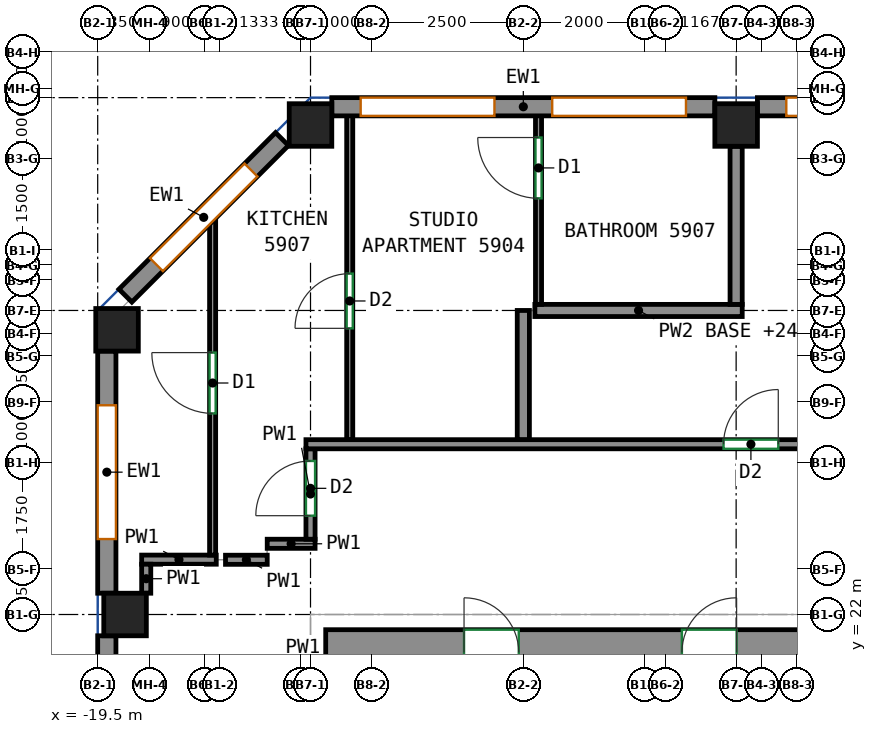
"""IFC4 building model, lengths in metres.
Left out: names, types, materials, properties, quantities, classifications, styles, units other than length and angle.
Written with IfcOpenShell. Run it as: python <this file> out.ifc"""

import sys

from ifc_helpers import new_model, si_unit, direction, frame, frame_2d, origin, origin_2d, place, context, subcontext, project, spatial, rectangle, extrude, source, transform, mapped, element, fill, save


model = new_model("IFC4")
c1 = context("Model", 3, precision=1e-05, world=origin(), true_north=direction((0.0, 1.0)))
c2 = subcontext(c1, "Body", "Model", "MODEL_VIEW")
j1 = project(units=[si_unit("LENGTHUNIT", "METRE"), si_unit("PLANEANGLEUNIT", "RADIAN")], contexts=[c1])
p1 = place(None, origin())
s1 = spatial("IfcSite", under=j1, at=p1, CompositionType="ELEMENT")
p2 = place(p1, origin())
s2 = spatial("IfcBuilding", under=s1, at=p2, CompositionType="ELEMENT")
p3 = place(p2, frame((0.0, 0.0, 245.8)))
s3 = spatial("IfcBuildingStorey", under=s2, at=p3, CompositionType="ELEMENT", Elevation=245.8)
m1 = source(origin(), c2, "Body", "SweptSolid", [
    extrude(rectangle(XDim=0.7, YDim=0.7, at=origin_2d()), origin(), (0.0, 0.0, 1.0), 3.12),
])
for number, where, z_axis, x_axis in (
    (1, (-19.182, 26.682, 0.0), (0.0, 0.0, 1.0), (1.0, 0.0, 0.0)),
    (2, (-19.05, 22.0, 0.0), (0.0, 0.0, 1.0), (1.0, 0.0, 0.0)),
    (3, (-16.0, 30.05, 0.0), (0.0, 0.0, 1.0), (1.0, 0.0, 0.0)),
    (4, (-9.0, 30.05, 0.0), (0.0, 0.0, 1.0), (1.0, 0.0, 0.0)),
):
    element("IfcColumn", number, at=place(p3, frame(where, z_axis=z_axis, x_axis=x_axis)), inside=s3, PredefinedType="COLUMN", context=c2, shape_type="MappedRepresentation", body=[
        mapped(m1, transform((0.0, 0.0, 0.0))),
    ])
m2 = source(origin(), c2, "Body", "SweptSolid", [
    extrude(rectangle(XDim=33.6, YDim=0.75, at=frame_2d((16.8, 0.0))), origin(), (0.0, 0.0, 1.0), 3.12),
])
p4 = place(p3, frame((-15.75, 21.375, 0.0), z_axis=(0.0, 0.0, 1.0), x_axis=(1.0, 0.0, 0.0)))
e5 = element("IfcWall", 5, at=p4, inside=s3, PredefinedType="SHEAR", context=c2, shape_type="MappedRepresentation", body=[
    mapped(m2, transform((0.0, 0.0, 0.0))),
])
p5 = place(p4, frame((5.858, 0.0, 0.0)))
e6 = element("IfcOpeningElement", 6, at=p5, cuts=e5, PredefinedType="OPENING", context=c2, shape_type="SweptSolid", body=[
    extrude(rectangle(XDim=0.9, YDim=2.1, at=frame_2d((0.45, 1.05))), frame((0.0, 0.385, 0.0), z_axis=(0.0, -1.0, 0.0), x_axis=(1.0, 0.0, 0.0)), (0.0, 0.0, 1.0), 0.77),
])
p6 = place(p4, frame((10.923, 0.0, 0.0)))
e7 = element("IfcOpeningElement", 7, at=p6, cuts=e5, PredefinedType="OPENING", context=c2, shape_type="SweptSolid", body=[
    extrude(rectangle(XDim=0.9, YDim=2.1, at=frame_2d((0.45, 1.05))), frame((0.0, 0.385, 0.0), z_axis=(0.0, -1.0, 0.0), x_axis=(1.0, 0.0, 0.0)), (0.0, 0.0, 1.0), 0.77),
])
p7 = place(p4, frame((15.988, 0.0, 0.0)))
e8 = element("IfcOpeningElement", 8, at=p7, cuts=e5, PredefinedType="OPENING", context=c2, shape_type="SweptSolid", body=[
    extrude(rectangle(XDim=0.9, YDim=2.1, at=frame_2d((0.45, 1.05))), frame((0.0, 0.385, 0.0), z_axis=(0.0, -1.0, 0.0), x_axis=(1.0, 0.0, 0.0)), (0.0, 0.0, 1.0), 0.77),
])
p8 = place(p4, frame((21.643, 0.0, 0.0)))
e9 = element("IfcOpeningElement", 9, at=p8, cuts=e5, PredefinedType="OPENING", context=c2, shape_type="SweptSolid", body=[
    extrude(rectangle(XDim=0.9, YDim=2.1, at=frame_2d((0.45, 1.05))), frame((0.0, 0.385, 0.0), z_axis=(0.0, -1.0, 0.0), x_axis=(1.0, 0.0, 0.0)), (0.0, 0.0, 1.0), 0.77),
])
p9 = place(p4, frame((27.07, 0.0, 0.0)))
e10 = element("IfcOpeningElement", 10, at=p9, cuts=e5, PredefinedType="OPENING", context=c2, shape_type="SweptSolid", body=[
    extrude(rectangle(XDim=0.9, YDim=2.1, at=frame_2d((0.45, 1.05))), frame((0.0, 0.385, 0.0), z_axis=(0.0, -1.0, 0.0), x_axis=(1.0, 0.0, 0.0)), (0.0, 0.0, 1.0), 0.77),
])
p10 = place(p4, frame((2.275, 0.0, 0.0)))
e11 = element("IfcOpeningElement", 11, at=p10, cuts=e5, PredefinedType="OPENING", context=c2, shape_type="SweptSolid", body=[
    extrude(rectangle(XDim=0.9, YDim=2.1, at=frame_2d((0.45, 1.05))), frame((0.0, 0.385, 0.0), z_axis=(0.0, -1.0, 0.0), x_axis=(1.0, 0.0, 0.0)), (0.0, 0.0, 1.0), 0.77),
])
p11 = place(p4, frame((30.425, 0.0, 0.0)))
e12 = element("IfcOpeningElement", 12, at=p11, cuts=e5, PredefinedType="OPENING", context=c2, shape_type="SweptSolid", body=[
    extrude(rectangle(XDim=0.9, YDim=2.1, at=frame_2d((0.45, 1.05))), frame((0.0, 0.385, 0.0), z_axis=(0.0, -1.0, 0.0), x_axis=(1.0, 0.0, 0.0)), (0.0, 0.0, 1.0), 0.77),
])
m3 = source(origin(), c2, "Body", "SweptSolid", [
    extrude(rectangle(XDim=6.3, YDim=0.3, at=frame_2d((3.15, 0.0))), origin(), (0.0, 0.0, 1.0), 3.12),
])
p12 = place(p3, frame((-2.35, 30.35, 0.0), z_axis=(0.0, 0.0, 1.0), x_axis=(-1.0, 0.0, 0.0)))
e13 = element("IfcWall", 13, at=p12, inside=s3, PredefinedType="SOLIDWALL", context=c2, shape_type="MappedRepresentation", body=[
    mapped(m3, transform((0.0, 0.0, 0.0))),
])
p13 = place(p12, frame((0.475, 0.0, 0.8)))
e14 = element("IfcOpeningElement", 14, at=p13, cuts=e13, PredefinedType="OPENING", context=c2, shape_type="SweptSolid", body=[
    extrude(rectangle(XDim=2.2, YDim=2.05, at=frame_2d((1.1, 1.025))), frame((0.0, 0.16, 0.0), z_axis=(0.0, -1.0, 0.0), x_axis=(1.0, 0.0, 0.0)), (0.0, 0.0, 1.0), 0.32),
])
p14 = place(p12, frame((3.625, 0.0, 0.8)))
e15 = element("IfcOpeningElement", 15, at=p14, cuts=e13, PredefinedType="OPENING", context=c2, shape_type="SweptSolid", body=[
    extrude(rectangle(XDim=2.2, YDim=2.05, at=frame_2d((1.1, 1.025))), frame((0.0, 0.16, 0.0), z_axis=(0.0, -1.0, 0.0), x_axis=(1.0, 0.0, 0.0)), (0.0, 0.0, 1.0), 0.32),
])
p15 = place(p3, frame((-9.35, 30.35, 0.0), z_axis=(0.0, 0.0, 1.0), x_axis=(-1.0, 0.0, 0.0)))
e16 = element("IfcWall", 16, at=p15, inside=s3, PredefinedType="SOLIDWALL", context=c2, shape_type="MappedRepresentation", body=[
    mapped(m3, transform((0.0, 0.0, 0.0))),
])
p16 = place(p15, frame((0.475, 0.0, 0.8)))
e17 = element("IfcOpeningElement", 17, at=p16, cuts=e16, PredefinedType="OPENING", context=c2, shape_type="SweptSolid", body=[
    extrude(rectangle(XDim=2.2, YDim=2.05, at=frame_2d((1.1, 1.025))), frame((0.0, 0.16, 0.0), z_axis=(0.0, -1.0, 0.0), x_axis=(1.0, 0.0, 0.0)), (0.0, 0.0, 1.0), 0.32),
])
p17 = place(p15, frame((3.625, 0.0, 0.8)))
e18 = element("IfcOpeningElement", 18, at=p17, cuts=e16, PredefinedType="OPENING", context=c2, shape_type="SweptSolid", body=[
    extrude(rectangle(XDim=2.2, YDim=2.05, at=frame_2d((1.1, 1.025))), frame((0.0, 0.16, 0.0), z_axis=(0.0, -1.0, 0.0), x_axis=(1.0, 0.0, 0.0)), (0.0, 0.0, 1.0), 0.32),
])
m4 = source(origin(), c2, "Body", "SweptSolid", [
    extrude(rectangle(XDim=3.642, YDim=0.3, at=frame_2d((1.821, 0.0))), origin(), (0.0, 0.0, 1.0), 3.12),
])
p18 = place(p3, frame((-16.469, 29.819, 0.0), z_axis=(0.0, 0.0, 1.0), x_axis=(-0.707106781187, -0.707106781187, 0.0)))
e19 = element("IfcWall", 19, at=p18, inside=s3, PredefinedType="SOLIDWALL", context=c2, shape_type="MappedRepresentation", body=[
    mapped(m4, transform((0.0, 0.0, 0.0))),
])
p19 = place(p18, frame((0.721, 0.0, 0.8)))
e20 = element("IfcOpeningElement", 20, at=p19, cuts=e19, PredefinedType="OPENING", context=c2, shape_type="SweptSolid", body=[
    extrude(rectangle(XDim=2.2, YDim=2.05, at=frame_2d((1.1, 1.025))), frame((0.0, 0.16, 0.0), z_axis=(0.0, -1.0, 0.0), x_axis=(1.0, 0.0, 0.0)), (0.0, 0.0, 1.0), 0.32),
])
m5 = source(origin(), c2, "Body", "SweptSolid", [
    extrude(rectangle(XDim=3.982, YDim=0.3, at=frame_2d((1.991, 0.0))), origin(), (0.0, 0.0, 1.0), 3.12),
])
p20 = place(p3, frame((-19.35, 26.332, 0.0), z_axis=(0.0, 0.0, 1.0), x_axis=(0.0, -1.0, 0.0)))
e21 = element("IfcWall", 21, at=p20, inside=s3, PredefinedType="SOLIDWALL", context=c2, shape_type="MappedRepresentation", body=[
    mapped(m5, transform((0.0, 0.0, 0.0))),
])
p21 = place(p20, frame((0.891, 0.0, 0.8)))
e22 = element("IfcOpeningElement", 22, at=p21, cuts=e21, PredefinedType="OPENING", context=c2, shape_type="SweptSolid", body=[
    extrude(rectangle(XDim=2.2, YDim=2.05, at=frame_2d((1.1, 1.025))), frame((0.0, 0.16, 0.0), z_axis=(0.0, -1.0, 0.0), x_axis=(1.0, 0.0, 0.0)), (0.0, 0.0, 1.0), 0.32),
])
m6 = source(origin(), c2, "Body", "SweptSolid", [
    extrude(rectangle(XDim=13.3, YDim=0.3, at=frame_2d((6.65, 0.0))), origin(), (0.0, 0.0, 1.0), 3.12),
])
p22 = place(p3, frame((-19.35, 21.65, 0.0), z_axis=(0.0, 0.0, 1.0), x_axis=(0.0, -1.0, 0.0)))
e23 = element("IfcWall", 23, at=p22, inside=s3, PredefinedType="SOLIDWALL", context=c2, shape_type="MappedRepresentation", body=[
    mapped(m6, transform((0.0, 0.0, 0.0))),
])
p23 = place(p22, frame((0.562, 0.0, 0.8)))
e24 = element("IfcOpeningElement", 24, at=p23, cuts=e23, PredefinedType="OPENING", context=c2, shape_type="SweptSolid", body=[
    extrude(rectangle(XDim=2.2, YDim=2.05, at=frame_2d((1.1, 1.025))), frame((0.0, 0.16, 0.0), z_axis=(0.0, -1.0, 0.0), x_axis=(1.0, 0.0, 0.0)), (0.0, 0.0, 1.0), 0.32),
])
p24 = place(p22, frame((3.887, 0.0, 0.8)))
e25 = element("IfcOpeningElement", 25, at=p24, cuts=e23, PredefinedType="OPENING", context=c2, shape_type="SweptSolid", body=[
    extrude(rectangle(XDim=2.2, YDim=2.05, at=frame_2d((1.1, 1.025))), frame((0.0, 0.16, 0.0), z_axis=(0.0, -1.0, 0.0), x_axis=(1.0, 0.0, 0.0)), (0.0, 0.0, 1.0), 0.32),
])
p25 = place(p22, frame((7.212, 0.0, 0.8)))
e26 = element("IfcOpeningElement", 26, at=p25, cuts=e23, PredefinedType="OPENING", context=c2, shape_type="SweptSolid", body=[
    extrude(rectangle(XDim=2.2, YDim=2.05, at=frame_2d((1.1, 1.025))), frame((0.0, 0.16, 0.0), z_axis=(0.0, -1.0, 0.0), x_axis=(1.0, 0.0, 0.0)), (0.0, 0.0, 1.0), 0.32),
])
p26 = place(p22, frame((10.538, 0.0, 0.8)))
e27 = element("IfcOpeningElement", 27, at=p26, cuts=e23, PredefinedType="OPENING", context=c2, shape_type="SweptSolid", body=[
    extrude(rectangle(XDim=2.2, YDim=2.05, at=frame_2d((1.1, 1.025))), frame((0.0, 0.16, 0.0), z_axis=(0.0, -1.0, 0.0), x_axis=(1.0, 0.0, 0.0)), (0.0, 0.0, 1.0), 0.32),
])
p27 = place(p3, frame((-17.55, 22.902, 0.0), z_axis=(0.0, 0.0, 1.0), x_axis=(-1.0, 0.0, 0.0)))
e28 = element("IfcWall", 28, at=p27, inside=s3, PredefinedType="PARTITIONING", context=c2, shape_type="SweptSolid", body=[
    extrude(rectangle(XDim=1.227, YDim=0.15, at=frame_2d((0.614, 0.0))), origin(), (0.0, 0.0, 1.0), 3.12),
])
p28 = place(p3, frame((-18.702, 22.827, 0.0), z_axis=(0.0, 0.0, 1.0), x_axis=(0.0, -1.0, 0.0)))
e29 = element("IfcWall", 29, at=p28, inside=s3, PredefinedType="PARTITIONING", context=c2, shape_type="SweptSolid", body=[
    extrude(rectangle(XDim=0.477, YDim=0.15, at=frame_2d((0.238, 0.0))), origin(), (0.0, 0.0, 1.0), 3.12),
])
p29 = place(p3, frame((-16.712, 22.9, 0.0), z_axis=(0.0, 0.0, 1.0), x_axis=(-1.0, 0.0, 0.0)))
e30 = element("IfcWall", 30, at=p29, inside=s3, PredefinedType="PARTITIONING", context=c2, shape_type="SweptSolid", body=[
    extrude(rectangle(XDim=0.686, YDim=0.15, at=frame_2d((0.343, 0.0))), origin(), (0.0, 0.0, 1.0), 3.12),
])
p30 = place(p3, frame((-15.925, 23.163, 0.0), z_axis=(0.0, 0.0, 1.0), x_axis=(-1.0, 0.0, 0.0)))
e31 = element("IfcWall", 31, at=p30, inside=s3, PredefinedType="PARTITIONING", context=c2, shape_type="SweptSolid", body=[
    extrude(rectangle(XDim=0.787, YDim=0.15, at=frame_2d((0.394, 0.0))), origin(), (0.0, 0.0, 1.0), 3.12),
])
p31 = place(p3, frame((-16.0, 23.238, 0.0), z_axis=(0.0, 0.0, 1.0), x_axis=(0.0, 1.0, 0.0)))
e32 = element("IfcWall", 32, at=p31, inside=s3, PredefinedType="PARTITIONING", context=c2, shape_type="SweptSolid", body=[
    extrude(rectangle(XDim=1.487, YDim=0.15, at=frame_2d((0.744, 0.0))), origin(), (0.0, 0.0, 1.0), 3.12),
])
p32 = place(p31, frame((0.387, 0.0, 0.0)))
e33 = element("IfcOpeningElement", 33, at=p32, cuts=e32, PredefinedType="OPENING", context=c2, shape_type="SweptSolid", body=[
    extrude(rectangle(XDim=0.9, YDim=2.1, at=frame_2d((0.45, 1.05))), frame((0.0, 0.085, 0.0), z_axis=(0.0, -1.0, 0.0), x_axis=(1.0, 0.0, 0.0)), (0.0, 0.0, 1.0), 0.17),
])
p33 = place(p3, frame((-16.075, 24.8, 0.0), z_axis=(0.0, 0.0, 1.0), x_axis=(1.0, 0.0, 0.0)))
e34 = element("IfcWall", 34, at=p33, inside=s3, PredefinedType="PARTITIONING", context=c2, shape_type="SweptSolid", body=[
    extrude(rectangle(XDim=36.073, YDim=0.15, at=frame_2d((18.037, 0.0))), origin(), (0.0, 0.0, 1.0), 3.12),
])
p34 = place(p33, frame((6.868, 0.0, 0.0)))
e35 = element("IfcOpeningElement", 35, at=p34, cuts=e34, PredefinedType="OPENING", context=c2, shape_type="SweptSolid", body=[
    extrude(rectangle(XDim=0.9, YDim=2.1, at=frame_2d((0.45, 1.05))), frame((0.0, 0.085, 0.0), z_axis=(0.0, -1.0, 0.0), x_axis=(1.0, 0.0, 0.0)), (0.0, 0.0, 1.0), 0.17),
])
p35 = place(p33, frame((31.009, 0.0, 0.0)))
e36 = element("IfcOpeningElement", 36, at=p35, cuts=e34, PredefinedType="OPENING", context=c2, shape_type="SweptSolid", body=[
    extrude(rectangle(XDim=1.0, YDim=2.1, at=frame_2d((0.5, 1.05))), frame((0.0, 0.085, 0.0), z_axis=(0.0, -1.0, 0.0), x_axis=(1.0, 0.0, 0.0)), (0.0, 0.0, 1.0), 0.17),
])
p36 = place(p3, frame((-12.5, 27.0, 0.0), z_axis=(0.0, 0.0, 1.0), x_axis=(0.0, -1.0, 0.0)))
e37 = element("IfcWall", 37, at=p36, inside=s3, PredefinedType="PARTITIONING", context=c2, shape_type="SweptSolid", body=[
    extrude(rectangle(XDim=2.123, YDim=0.2, at=frame_2d((1.062, 0.0))), origin(), (0.0, 0.0, 1.0), 3.12),
])
p37 = place(p3, frame((-8.9, 27.0, 0.0), z_axis=(0.0, 0.0, 1.0), x_axis=(-1.0, 0.0, 0.0)))
e38 = element("IfcWall", 38, at=p37, inside=s3, PredefinedType="PARTITIONING", context=c2, shape_type="SweptSolid", body=[
    extrude(rectangle(XDim=3.41, YDim=0.2, at=frame_2d((1.705, 0.0))), origin(), (0.0, 0.0, 1.0), 2.57),
])
p38 = place(p3, frame((-9.0, 27.1, 0.0), z_axis=(0.0, 0.0, 1.0), x_axis=(0.0, 1.0, 0.0)))
e39 = element("IfcWall", 39, at=p38, inside=s3, PredefinedType="PARTITIONING", context=c2, shape_type="SweptSolid", body=[
    extrude(rectangle(XDim=2.6, YDim=0.2, at=frame_2d((1.3, 0.0))), origin(), (0.0, 0.0, 1.0), 3.12),
])
p39 = place(p3, frame((-17.61, 22.977, 0.0), z_axis=(0.0, 0.0, 1.0), x_axis=(0.0, 1.0, 0.0)))
e40 = element("IfcWall", 40, at=p39, inside=s3, PredefinedType="PARTITIONING", context=c2, shape_type="SweptSolid", body=[
    extrude(rectangle(XDim=5.559, YDim=0.1, at=frame_2d((2.779, 0.0))), origin(), (0.0, 0.0, 1.0), 3.12),
])
p40 = place(p39, frame((2.33, 0.0, 0.0)))
e41 = element("IfcOpeningElement", 41, at=p40, cuts=e40, PredefinedType="OPENING", context=c2, shape_type="SweptSolid", body=[
    extrude(rectangle(XDim=1.0, YDim=2.1, at=frame_2d((0.5, 1.05))), frame((0.0, 0.06, 0.0), z_axis=(0.0, -1.0, 0.0), x_axis=(1.0, 0.0, 0.0)), (0.0, 0.0, 1.0), 0.12),
])
p41 = place(p3, frame((-15.355, 24.877, 0.0), z_axis=(0.0, 0.0, 1.0), x_axis=(0.0, 1.0, 0.0)))
e42 = element("IfcWall", 42, at=p41, inside=s3, PredefinedType="PARTITIONING", context=c2, shape_type="SweptSolid", body=[
    extrude(rectangle(XDim=5.373, YDim=0.1, at=frame_2d((2.687, 0.0))), origin(), (0.0, 0.0, 1.0), 3.12),
])
p42 = place(p41, frame((1.829, 0.0, 0.0)))
e43 = element("IfcOpeningElement", 43, at=p42, cuts=e42, PredefinedType="OPENING", context=c2, shape_type="SweptSolid", body=[
    extrude(rectangle(XDim=0.9, YDim=2.1, at=frame_2d((0.45, 1.05))), frame((0.0, 0.06, 0.0), z_axis=(0.0, -1.0, 0.0), x_axis=(1.0, 0.0, 0.0)), (0.0, 0.0, 1.0), 0.12),
])
p43 = place(p3, frame((-12.25, 27.1, 0.0), z_axis=(0.0, 0.0, 1.0), x_axis=(0.0, 1.0, 0.0)))
e44 = element("IfcWall", 44, at=p43, inside=s3, PredefinedType="PARTITIONING", context=c2, shape_type="SweptSolid", body=[
    extrude(rectangle(XDim=3.15, YDim=0.1, at=frame_2d((1.575, 0.0))), origin(), (0.0, 0.0, 1.0), 3.12),
])
p44 = place(p43, frame((1.744, 0.0, 0.0)))
e45 = element("IfcOpeningElement", 45, at=p44, cuts=e44, PredefinedType="OPENING", context=c2, shape_type="SweptSolid", body=[
    extrude(rectangle(XDim=1.0, YDim=2.1, at=frame_2d((0.5, 1.05))), frame((0.0, 0.06, 0.0), z_axis=(0.0, -1.0, 0.0), x_axis=(1.0, 0.0, 0.0)), (0.0, 0.0, 1.0), 0.12),
])
p45 = place(p14, origin())
e46 = element("IfcWindow", 46, at=p45, inside=s3, PartitioningType="SINGLE_PANEL", PredefinedType="WINDOW", context=c2, shape_type="SweptSolid", body=[
    extrude(rectangle(XDim=2.2, YDim=2.05, at=frame_2d((1.1, 1.025))), frame((0.0, 0.03, 0.0), z_axis=(0.0, -1.0, 0.0), x_axis=(1.0, 0.0, 0.0)), (0.0, 0.0, 1.0), 0.06),
])
fill(e15, e46)
p46 = place(p16, origin())
e47 = element("IfcWindow", 47, at=p46, inside=s3, PartitioningType="SINGLE_PANEL", PredefinedType="WINDOW", context=c2, shape_type="SweptSolid", body=[
    extrude(rectangle(XDim=2.2, YDim=2.05, at=frame_2d((1.1, 1.025))), frame((0.0, 0.03, 0.0), z_axis=(0.0, -1.0, 0.0), x_axis=(1.0, 0.0, 0.0)), (0.0, 0.0, 1.0), 0.06),
])
fill(e17, e47)
p47 = place(p17, origin())
e48 = element("IfcWindow", 48, at=p47, inside=s3, PartitioningType="SINGLE_PANEL", PredefinedType="WINDOW", context=c2, shape_type="SweptSolid", body=[
    extrude(rectangle(XDim=2.2, YDim=2.05, at=frame_2d((1.1, 1.025))), frame((0.0, 0.03, 0.0), z_axis=(0.0, -1.0, 0.0), x_axis=(1.0, 0.0, 0.0)), (0.0, 0.0, 1.0), 0.06),
])
fill(e18, e48)
p48 = place(p19, origin())
e49 = element("IfcWindow", 49, at=p48, inside=s3, PartitioningType="SINGLE_PANEL", PredefinedType="WINDOW", context=c2, shape_type="SweptSolid", body=[
    extrude(rectangle(XDim=2.2, YDim=2.05, at=frame_2d((1.1, 1.025))), frame((0.0, 0.03, 0.0), z_axis=(0.0, -1.0, 0.0), x_axis=(1.0, 0.0, 0.0)), (0.0, 0.0, 1.0), 0.06),
])
fill(e20, e49)
p49 = place(p21, origin())
e50 = element("IfcWindow", 50, at=p49, inside=s3, PartitioningType="SINGLE_PANEL", PredefinedType="WINDOW", context=c2, shape_type="SweptSolid", body=[
    extrude(rectangle(XDim=2.2, YDim=2.05, at=frame_2d((1.1, 1.025))), frame((0.0, 0.03, 0.0), z_axis=(0.0, -1.0, 0.0), x_axis=(1.0, 0.0, 0.0)), (0.0, 0.0, 1.0), 0.06),
])
fill(e22, e50)
p50 = place(p32, origin())
e51 = element("IfcDoor", 51, at=p50, inside=s3, OperationType="SINGLE_SWING_LEFT", PredefinedType="DOOR", context=c2, shape_type="SweptSolid", body=[
    extrude(rectangle(XDim=0.9, YDim=2.1, at=frame_2d((0.45, 1.05))), frame((0.0, 0.025, 0.0), z_axis=(0.0, -1.0, 0.0), x_axis=(1.0, 0.0, 0.0)), (0.0, 0.0, 1.0), 0.05),
])
fill(e33, e51)
p51 = place(p34, origin())
e52 = element("IfcDoor", 52, at=p51, inside=s3, OperationType="SINGLE_SWING_RIGHT", PredefinedType="DOOR", context=c2, shape_type="SweptSolid", body=[
    extrude(rectangle(XDim=0.9, YDim=2.1, at=frame_2d((0.45, 1.05))), frame((0.0, 0.025, 0.0), z_axis=(0.0, -1.0, 0.0), x_axis=(1.0, 0.0, 0.0)), (0.0, 0.0, 1.0), 0.05),
])
fill(e35, e52)
p52 = place(p40, origin())
e53 = element("IfcDoor", 53, at=p52, inside=s3, OperationType="SINGLE_SWING_RIGHT", PredefinedType="DOOR", context=c2, shape_type="SweptSolid", body=[
    extrude(rectangle(XDim=1.0, YDim=2.1, at=frame_2d((0.5, 1.05))), frame((0.0, 0.025, 0.0), z_axis=(0.0, -1.0, 0.0), x_axis=(1.0, 0.0, 0.0)), (0.0, 0.0, 1.0), 0.05),
])
fill(e41, e53)
p53 = place(p42, origin())
e54 = element("IfcDoor", 54, at=p53, inside=s3, OperationType="SINGLE_SWING_LEFT", PredefinedType="DOOR", context=c2, shape_type="SweptSolid", body=[
    extrude(rectangle(XDim=0.9, YDim=2.1, at=frame_2d((0.45, 1.05))), frame((0.0, 0.025, 0.0), z_axis=(0.0, -1.0, 0.0), x_axis=(1.0, 0.0, 0.0)), (0.0, 0.0, 1.0), 0.05),
])
fill(e43, e54)
p54 = place(p44, origin())
e55 = element("IfcDoor", 55, at=p54, inside=s3, OperationType="SINGLE_SWING_RIGHT", PredefinedType="DOOR", context=c2, shape_type="SweptSolid", body=[
    extrude(rectangle(XDim=1.0, YDim=2.1, at=frame_2d((0.5, 1.05))), frame((0.0, 0.025, 0.0), z_axis=(0.0, -1.0, 0.0), x_axis=(1.0, 0.0, 0.0)), (0.0, 0.0, 1.0), 0.05),
])
fill(e45, e55)
save(model, sys.argv[1])
